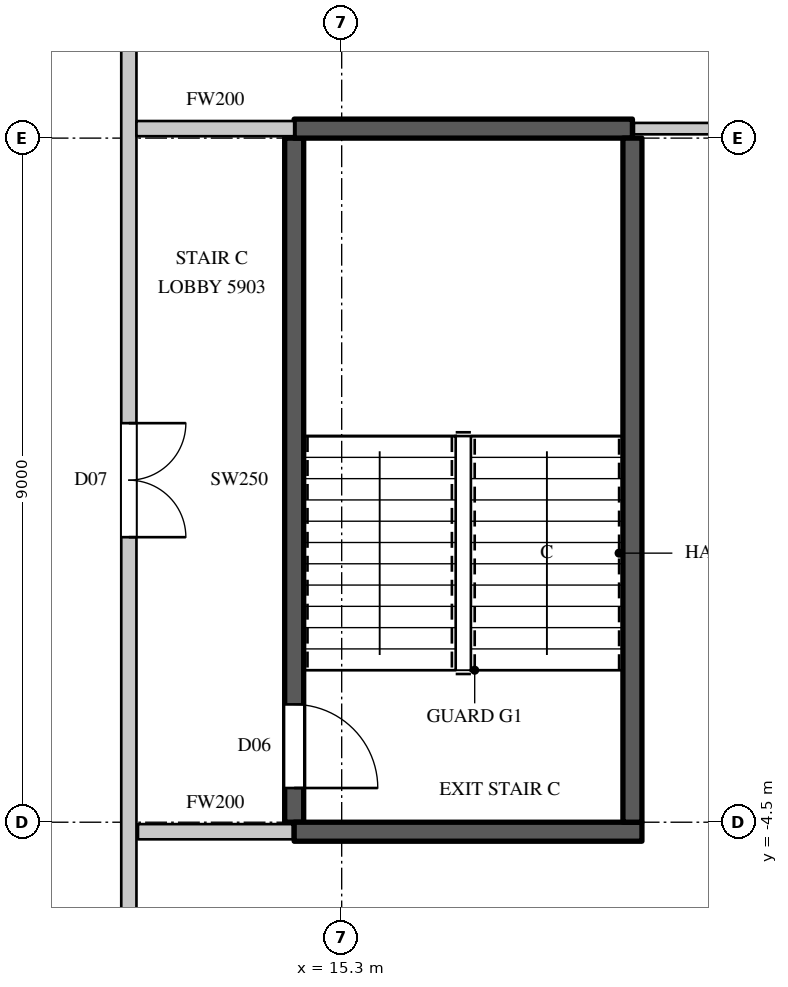
"""IFC4 building model, lengths in metres.
Left out: names, types, materials, properties, quantities, classifications, styles, units other than length and angle.
Written with IfcOpenShell. Run it as: python <this file> out.ifc"""

import sys

from ifc_helpers import new_model, si_unit, direction, frame, frame_2d, origin, place, context, subcontext, project, spatial, rectangle, extrude, element, fill, save


model = new_model("IFC4")
c1 = context("Model", 3, precision=1e-05, world=origin(), true_north=direction((0.0, 1.0)))
c2 = subcontext(c1, "Body", "Model", "MODEL_VIEW")
j1 = project(units=[si_unit("LENGTHUNIT", "METRE"), si_unit("PLANEANGLEUNIT", "RADIAN")], contexts=[c1])
p1 = place(None, origin())
s1 = spatial("IfcSite", under=j1, at=p1, CompositionType="ELEMENT")
p2 = place(p1, origin())
s2 = spatial("IfcBuilding", under=s1, at=p2, CompositionType="ELEMENT")
p3 = place(p2, frame((0.0, 0.0, 263.9)))
s3 = spatial("IfcBuildingStorey", under=s2, at=p3, CompositionType="ELEMENT", Elevation=263.9)
p4 = place(p3, frame((12.5, -13.5, 0.0), z_axis=(0.0, 0.0, 1.0), x_axis=(0.0, 1.0, 0.0)))
e1 = element("IfcWall", 1, at=p4, inside=s3, PredefinedType="PARTITIONING", context=c2, shape_type="SweptSolid", body=[
    extrude(rectangle(XDim=26.9, YDim=0.2, at=frame_2d((13.45, 0.0))), origin(), (0.0, 0.0, 1.0), 3.8),
])
p5 = place(p4, frame((12.75, 0.0, 0.0)))
e2 = element("IfcOpeningElement", 2, at=p5, cuts=e1, PredefinedType="OPENING", context=c2, shape_type="SweptSolid", body=[
    extrude(rectangle(XDim=1.5, YDim=2.4, at=frame_2d((0.75, 1.2))), frame((0.0, 0.11, 0.0), z_axis=(0.0, -1.0, 0.0), x_axis=(1.0, 0.0, 0.0)), (0.0, 0.0, 1.0), 0.22),
])
p6 = place(p3, frame((12.6, 4.625, 0.0), z_axis=(0.0, 0.0, 1.0), x_axis=(1.0, 0.0, 0.0)))
e3 = element("IfcWall", 3, at=p6, inside=s3, PredefinedType="PARTITIONING", context=c2, shape_type="SweptSolid", body=[
    extrude(rectangle(XDim=2.075, YDim=0.2, at=frame_2d((1.038, 0.0))), origin(), (0.0, 0.0, 1.0), 3.8),
])
p7 = place(p3, frame((12.62, -4.625, 0.0), z_axis=(0.0, 0.0, 1.0), x_axis=(1.0, 0.0, 0.0)))
e4 = element("IfcWall", 4, at=p7, inside=s3, PredefinedType="PARTITIONING", context=c2, shape_type="SweptSolid", body=[
    extrude(rectangle(XDim=2.035, YDim=0.2, at=frame_2d((1.018, 0.0))), origin(), (0.0, 0.0, 1.0), 3.8),
])
p8 = place(p3, frame((19.145, 4.625, 0.0), z_axis=(0.0, 0.0, 1.0), x_axis=(1.0, 0.0, 0.0)))
e5 = element("IfcWall", 5, at=p8, inside=s3, PredefinedType="PARTITIONING", context=c2, shape_type="SweptSolid", body=[
    extrude(rectangle(XDim=4.605, YDim=0.15, at=frame_2d((2.302, 0.0))), origin(), (0.0, 0.0, 1.0), 3.8),
])
p9 = place(p3, frame((14.675, -4.5, 0.0), z_axis=(0.0, 0.0, 1.0), x_axis=(0.0, 1.0, 0.0)))
e6 = element("IfcWall", 6, at=p9, inside=s3, PredefinedType="SHEAR", context=c2, shape_type="SweptSolid", body=[
    extrude(rectangle(XDim=9.0, YDim=0.25, at=frame_2d((4.5, 0.0))), origin(), (0.0, 0.0, 1.0), 3.8),
])
p10 = place(p9, frame((0.45, 0.0, 0.0)))
e7 = element("IfcOpeningElement", 7, at=p10, cuts=e6, PredefinedType="OPENING", context=c2, shape_type="SweptSolid", body=[
    extrude(rectangle(XDim=1.1, YDim=2.2, at=frame_2d((0.55, 1.1))), frame((0.0, 0.135, 0.0), z_axis=(0.0, -1.0, 0.0), x_axis=(1.0, 0.0, 0.0)), (0.0, 0.0, 1.0), 0.27),
])
p11 = place(p3, frame((14.675, -4.625, 0.0), z_axis=(0.0, 0.0, 1.0), x_axis=(1.0, 0.0, 0.0)))
e8 = element("IfcWall", 8, at=p11, inside=s3, PredefinedType="SHEAR", context=c2, shape_type="SweptSolid", body=[
    extrude(rectangle(XDim=4.575, YDim=0.25, at=frame_2d((2.288, 0.0))), origin(), (0.0, 0.0, 1.0), 3.8),
])
p12 = place(p3, frame((14.675, 4.625, 0.0), z_axis=(0.0, 0.0, 1.0), x_axis=(1.0, 0.0, 0.0)))
e9 = element("IfcWall", 9, at=p12, inside=s3, PredefinedType="SHEAR", context=c2, shape_type="SweptSolid", body=[
    extrude(rectangle(XDim=4.45, YDim=0.25, at=frame_2d((2.225, 0.0))), origin(), (0.0, 0.0, 1.0), 3.8),
])
p13 = place(p3, frame((19.125, -4.5, 0.0), z_axis=(0.0, 0.0, 1.0), x_axis=(0.0, 1.0, 0.0)))
e10 = element("IfcWall", 10, at=p13, inside=s3, PredefinedType="SHEAR", context=c2, shape_type="SweptSolid", body=[
    extrude(rectangle(XDim=9.0, YDim=0.25, at=frame_2d((4.5, 0.0))), origin(), (0.0, 0.0, 1.0), 3.8),
])
p14 = place(p5, origin())
e11 = element("IfcDoor", 11, at=p14, inside=s3, OperationType="DOUBLE_DOOR_SINGLE_SWING", PredefinedType="DOOR", context=c2, shape_type="SweptSolid", body=[
    extrude(rectangle(XDim=1.5, YDim=2.4, at=frame_2d((0.75, 1.2))), frame((0.0, 0.025, 0.0), z_axis=(0.0, -1.0, 0.0), x_axis=(1.0, 0.0, 0.0)), (0.0, 0.0, 1.0), 0.05),
])
fill(e2, e11)
p15 = place(p10, origin())
e12 = element("IfcDoor", 12, at=p15, inside=s3, OperationType="SINGLE_SWING_RIGHT", PredefinedType="DOOR", context=c2, shape_type="SweptSolid", body=[
    extrude(rectangle(XDim=1.1, YDim=2.2, at=frame_2d((0.55, 1.1))), frame((0.0, 0.025, 0.0), z_axis=(0.0, -1.0, 0.0), x_axis=(1.0, 0.0, 0.0)), (0.0, 0.0, 1.0), 0.05),
])
fill(e7, e12)
save(model, sys.argv[1])
